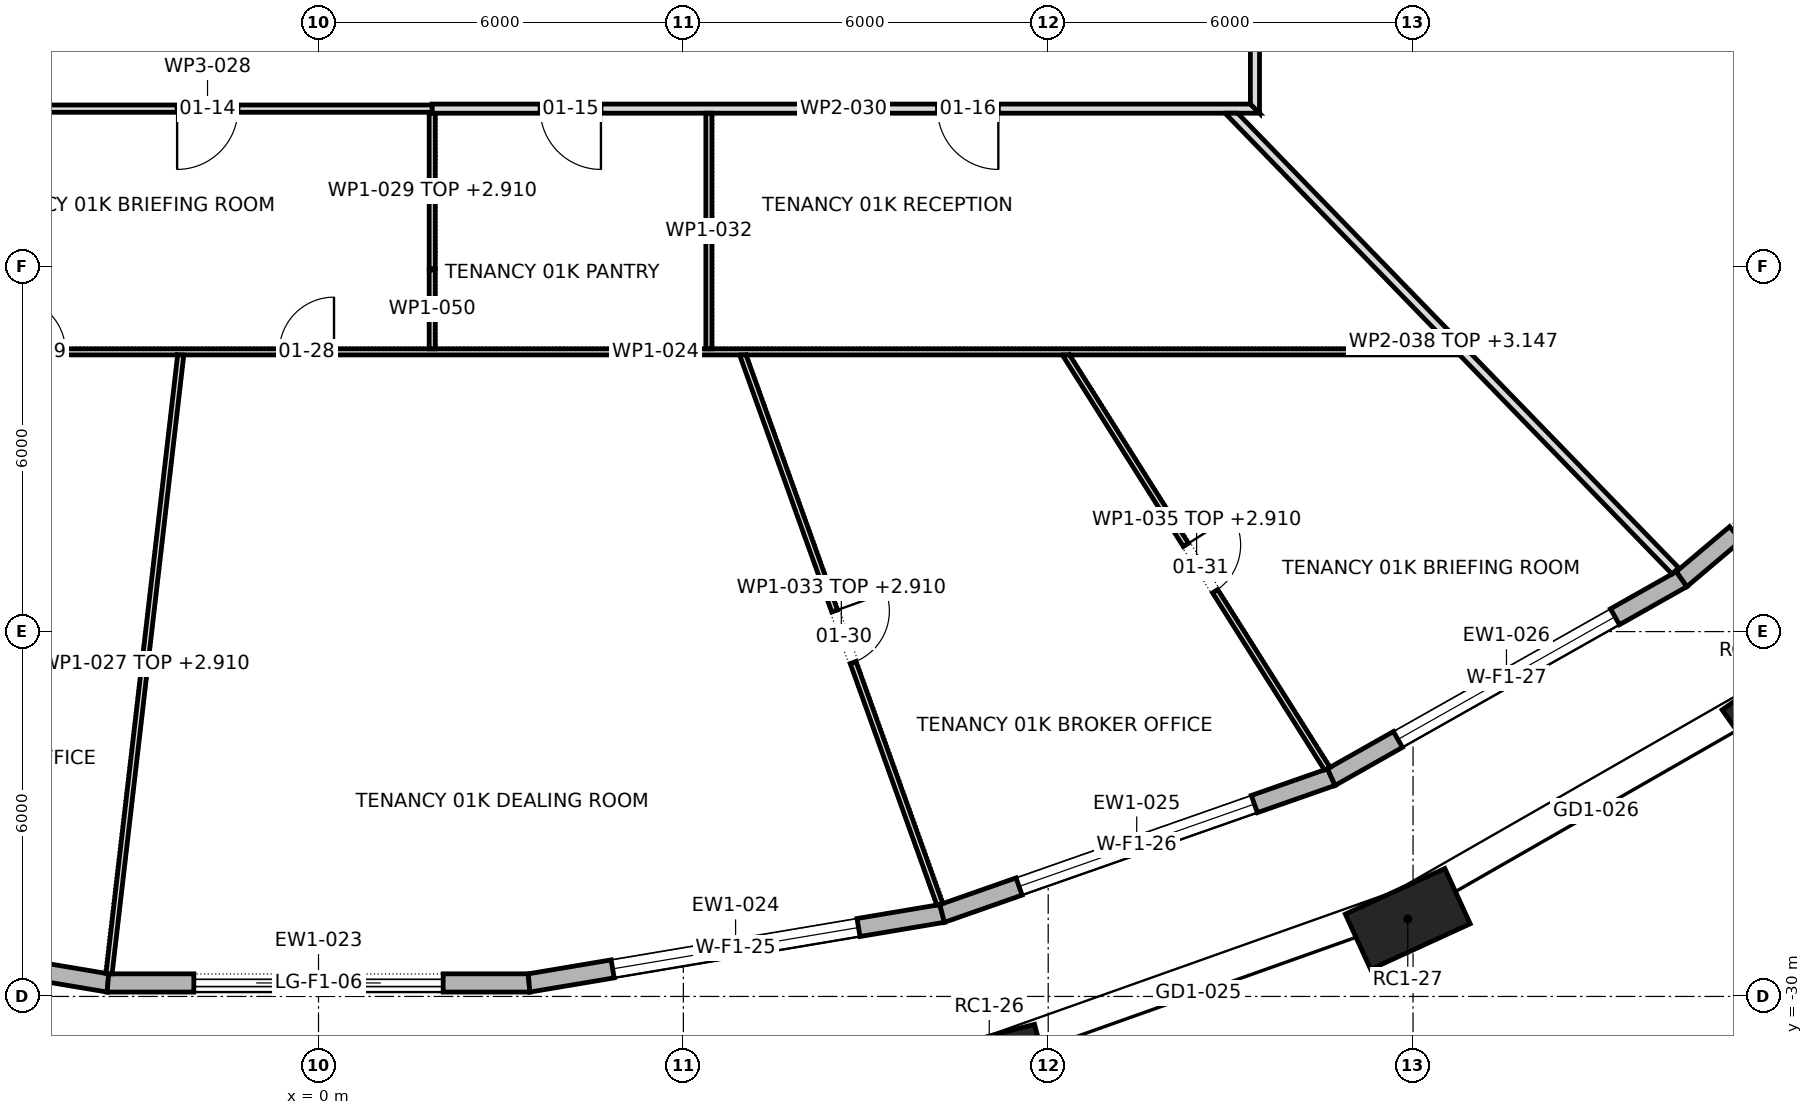
"""IFC4 building model, lengths in metres.
Left out: names, types, materials, properties, quantities, classifications, styles, units other than length and angle.
Written with IfcOpenShell. Run it as: python <this file> out.ifc"""

import sys

from ifc_helpers import new_model, si_unit, direction, frame, frame_2d, origin, origin_2d, place, context, subcontext, project, spatial, polyline, rectangle, outline, extrude, element, fill, save


model = new_model("IFC4")
c1 = context("Model", 3, precision=1e-05, world=origin(), true_north=direction((0.0, 1.0)))
c2 = subcontext(c1, "Body", "Model", "MODEL_VIEW")
j1 = project(units=[si_unit("LENGTHUNIT", "METRE"), si_unit("PLANEANGLEUNIT", "RADIAN")], contexts=[c1])
p1 = place(None, origin())
s1 = spatial("IfcSite", under=j1, at=p1, CompositionType="ELEMENT")
p2 = place(p1, origin())
s2 = spatial("IfcBuilding", under=s1, at=p2, CompositionType="ELEMENT")
p3 = place(p2, frame((0.0, 0.0, 27.7)))
s3 = spatial("IfcBuildingStorey", under=s2, at=p3, CompositionType="ELEMENT", Elevation=27.7)
for number, where, z_axis, x_axis in (
    (1, (11.031, -31.169, 0.0), (0.0, 0.0, 1.0), (0.968, 0.252, 0.0)),
    (2, (17.913, -28.725, 0.0), (0.0, 0.0, 1.0), (0.909, 0.417, 0.0)),
    (3, (24.107, -25.178, 0.0), (0.0, 0.0, 1.0), (0.818, 0.575, 0.0)),
):
    element("IfcColumn", number, at=place(p3, frame(where, z_axis=z_axis, x_axis=x_axis)), inside=s3, PredefinedType="COLUMN", context=c2, shape_type="SweptSolid", body=[
        extrude(rectangle(XDim=1.8, YDim=1.0, at=origin_2d()), origin(), (0.0, 0.0, 1.0), 4.2),
    ])
p4 = place(p3, frame((-10.256, -28.635, 0.0), z_axis=(0.0, 0.0, 1.0), x_axis=(0.986141805867, -0.165904607291, 0.0)))
e4 = element("IfcWall", 4, at=p4, inside=s3, PredefinedType="STANDARD", context=c2, shape_type="SweptSolid", body=[
    extrude(outline(polyline([(-0.013, -0.15), (6.901, -0.15), (6.876, 0.15), (0.013, 0.15), (-0.013, -0.15)])), origin(), (0.0, 0.0, 1.0), 3.9),
])
p5 = place(p4, frame((1.394, 0.0, 0.6)))
e5 = element("IfcOpeningElement", 5, at=p5, cuts=e4, PredefinedType="OPENING", context=c2, shape_type="SweptSolid", body=[
    extrude(rectangle(XDim=4.1, YDim=2.85, at=frame_2d((2.05, 1.425))), frame((0.0, 0.162, 0.0), z_axis=(0.0, -1.0, 0.0), x_axis=(1.0, 0.0, 0.0)), (0.0, 0.0, 1.0), 0.324),
])
p6 = place(p3, frame((-3.463, -29.778, 0.0), z_axis=(0.0, 0.0, 1.0), x_axis=(1.0, 0.0, 0.0)))
e6 = element("IfcWall", 6, at=p6, inside=s3, PredefinedType="STANDARD", context=c2, shape_type="SweptSolid", body=[
    extrude(outline(polyline([(-0.012, -0.15), (6.938, -0.15), (6.913, 0.15), (0.012, 0.15), (-0.012, -0.15)])), origin(), (0.0, 0.0, 1.0), 3.9),
])
p7 = place(p6, frame((1.413, 0.0, 0.0)))
e7 = element("IfcOpeningElement", 7, at=p7, cuts=e6, PredefinedType="OPENING", context=c2, shape_type="SweptSolid", body=[
    extrude(rectangle(XDim=4.1, YDim=3.45, at=frame_2d((2.05, 1.725))), frame((0.0, 0.162, 0.0), z_axis=(0.0, -1.0, 0.0), x_axis=(1.0, 0.0, 0.0)), (0.0, 0.0, 1.0), 0.324),
])
p8 = place(p3, frame((3.463, -29.778, 0.0), z_axis=(0.0, 0.0, 1.0), x_axis=(0.986141805867, 0.165904607291, 0.0)))
e8 = element("IfcWall", 8, at=p8, inside=s3, PredefinedType="STANDARD", context=c2, shape_type="SweptSolid", body=[
    extrude(outline(polyline([(-0.012, -0.15), (6.901, -0.15), (6.876, 0.15), (0.012, 0.15), (-0.012, -0.15)])), origin(), (0.0, 0.0, 1.0), 3.9),
])
p9 = place(p8, frame((1.394, 0.0, 0.6)))
e9 = element("IfcOpeningElement", 9, at=p9, cuts=e8, PredefinedType="OPENING", context=c2, shape_type="SweptSolid", body=[
    extrude(rectangle(XDim=4.1, YDim=2.85, at=frame_2d((2.05, 1.425))), frame((0.0, 0.162, 0.0), z_axis=(0.0, -1.0, 0.0), x_axis=(1.0, 0.0, 0.0)), (0.0, 0.0, 1.0), 0.324),
])
p10 = place(p3, frame((10.256, -28.635, 0.0), z_axis=(0.0, 0.0, 1.0), x_axis=(0.943767392455, 0.330610206947, 0.0)))
e10 = element("IfcWall", 10, at=p10, inside=s3, PredefinedType="STANDARD", context=c2, shape_type="SweptSolid", body=[
    extrude(outline(polyline([(-0.013, -0.15), (6.795, -0.15), (6.768, 0.15), (0.013, 0.15), (-0.013, -0.15)])), origin(), (0.0, 0.0, 1.0), 3.9),
])
p11 = place(p10, frame((1.341, 0.0, 0.6)))
e11 = element("IfcOpeningElement", 11, at=p11, cuts=e10, PredefinedType="OPENING", context=c2, shape_type="SweptSolid", body=[
    extrude(rectangle(XDim=4.1, YDim=2.85, at=frame_2d((2.05, 1.425))), frame((0.0, 0.162, 0.0), z_axis=(0.0, -1.0, 0.0), x_axis=(1.0, 0.0, 0.0)), (0.0, 0.0, 1.0), 0.324),
])
p12 = place(p3, frame((16.656, -26.393, 0.0), z_axis=(0.0, 0.0, 1.0), x_axis=(0.8705786416, 0.492029296678, 0.0)))
e12 = element("IfcWall", 12, at=p12, inside=s3, PredefinedType="STANDARD", context=c2, shape_type="SweptSolid", body=[
    extrude(outline(polyline([(-0.013, -0.15), (6.632, -0.15), (6.604, 0.15), (0.013, 0.15), (-0.013, -0.15)])), origin(), (0.0, 0.0, 1.0), 3.9),
])
p13 = place(p12, frame((1.259, 0.0, 0.6)))
e13 = element("IfcOpeningElement", 13, at=p13, cuts=e12, PredefinedType="OPENING", context=c2, shape_type="SweptSolid", body=[
    extrude(rectangle(XDim=4.1, YDim=2.85, at=frame_2d((2.05, 1.425))), frame((0.0, 0.162, 0.0), z_axis=(0.0, -1.0, 0.0), x_axis=(1.0, 0.0, 0.0)), (0.0, 0.0, 1.0), 0.324),
])
p14 = place(p3, frame((22.417, -23.137, 0.0), z_axis=(0.0, 0.0, 1.0), x_axis=(0.763540615407, 0.645759807223, 0.0)))
e14 = element("IfcWall", 14, at=p14, inside=s3, PredefinedType="STANDARD", context=c2, shape_type="SweptSolid", body=[
    extrude(outline(polyline([(-0.014, -0.15), (6.435, -0.15), (6.405, 0.15), (0.014, 0.15), (-0.014, -0.15)])), origin(), (0.0, 0.0, 1.0), 3.9),
])
p15 = place(p14, frame((1.16, 0.0, 0.0)))
e15 = element("IfcOpeningElement", 15, at=p15, cuts=e14, PredefinedType="OPENING", context=c2, shape_type="SweptSolid", body=[
    extrude(rectangle(XDim=4.1, YDim=3.45, at=frame_2d((2.05, 1.725))), frame((0.0, 0.162, 0.0), z_axis=(0.0, -1.0, 0.0), x_axis=(1.0, 0.0, 0.0)), (0.0, 0.0, 1.0), 0.324),
])
p16 = place(p3, frame((-6.894, -19.4, 0.0), z_axis=(0.0, 0.0, 1.0), x_axis=(1.0, 0.0, 0.0)))
e16 = element("IfcWall", 16, at=p16, inside=s3, PredefinedType="PARTITIONING", context=c2, shape_type="SweptSolid", body=[
    extrude(outline(polyline([(0.0, -0.05), (1.526, -0.05), (3.052, -0.05), (4.578, -0.05), (4.578, -0.049), (4.587, -0.05), (6.454, -0.05), (8.321, -0.05), (10.188, -0.05), (12.055, -0.05), (13.922, -0.05), (13.925, -0.049), (13.925, -0.05), (15.696, -0.05), (17.468, -0.05), (19.239, -0.05), (19.243, -0.047), (19.245, -0.05), (20.848, -0.05), (22.451, -0.05), (24.054, -0.05), (25.657, -0.05), (25.657, -0.05), (25.614, -0.005), (25.614, -0.005), (25.561, 0.05), (23.819, 0.05), (22.076, 0.05), (20.334, 0.05), (18.591, 0.05), (16.849, 0.05), (15.106, 0.05), (13.364, 0.05), (13.364, 0.05), (13.264, 0.05), (13.264, 0.05), (11.781, 0.05), (10.297, 0.05), (8.814, 0.05), (8.814, 0.05), (8.714, 0.05), (8.714, 0.05), (6.978, 0.05), (5.243, 0.05), (3.507, 0.05), (1.771, 0.05), (0.036, 0.05), (0.0, -0.049), (0.0, -0.05)])), origin(), (0.0, 0.0, 1.0), 3.9),
])
p17 = place(p16, frame((6.249, 0.0, 0.0)))
e17 = element("IfcOpeningElement", 17, at=p17, cuts=e16, PredefinedType="OPENING", context=c2, shape_type="SweptSolid", body=[
    extrude(rectangle(XDim=0.9, YDim=2.1, at=frame_2d((0.45, 1.05))), frame((0.0, 0.062, 0.0), z_axis=(0.0, -1.0, 0.0), x_axis=(1.0, 0.0, 0.0)), (0.0, 0.0, 1.0), 0.124),
])
p18 = place(p16, frame((1.834, 0.0, 0.0)))
e18 = element("IfcOpeningElement", 18, at=p18, cuts=e16, PredefinedType="OPENING", context=c2, shape_type="SweptSolid", body=[
    extrude(rectangle(XDim=0.9, YDim=2.1, at=frame_2d((0.45, 1.05))), frame((0.0, 0.062, 0.0), z_axis=(0.0, -1.0, 0.0), x_axis=(1.0, 0.0, 0.0)), (0.0, 0.0, 1.0), 0.124),
])
p19 = place(p3, frame((-3.445, -29.626, 0.0), z_axis=(0.0, 0.0, 1.0), x_axis=(0.115096942751, 0.993354263981, 0.0)))
e19 = element("IfcWall", 19, at=p19, inside=s3, PredefinedType="PARTITIONING", context=c2, shape_type="SweptSolid", body=[
    extrude(outline(polyline([(10.25, -0.05), (10.25, -0.047), (10.238, 0.05), (8.532, 0.05), (6.825, 0.05), (5.119, 0.05), (3.413, 0.05), (1.706, 0.05), (0.0, 0.05), (0.0, -0.018), (0.004, -0.05), (1.711, -0.05), (3.419, -0.05), (5.127, -0.05), (6.834, -0.05), (8.542, -0.05), (10.25, -0.05)])), origin(), (0.0, 0.0, 1.0), 2.91),
])
p20 = place(p3, frame((1.87, -15.4, 0.0), z_axis=(0.0, 0.0, 1.0), x_axis=(-1.0, 0.0, 0.0)))
e20 = element("IfcWall", 20, at=p20, inside=s3, PredefinedType="PARTITIONING", context=c2, shape_type="SweptSolid", body=[
    extrude(rectangle(XDim=7.39, YDim=0.12, at=frame_2d((3.695, 0.0))), origin(), (0.0, 0.0, 1.0), 3.9),
])
p21 = place(p20, frame((3.195, 0.0, 0.0)))
e21 = element("IfcOpeningElement", 21, at=p21, cuts=e20, PredefinedType="OPENING", context=c2, shape_type="SweptSolid", body=[
    extrude(rectangle(XDim=1.0, YDim=2.1, at=frame_2d((0.5, 1.05))), frame((0.0, 0.072, 0.0), z_axis=(0.0, -1.0, 0.0), x_axis=(1.0, 0.0, 0.0)), (0.0, 0.0, 1.0), 0.144),
])
p22 = place(p3, frame((1.87, -15.46, 0.0), z_axis=(0.0, 0.0, 1.0), x_axis=(0.0, -1.0, 0.0)))
e22 = element("IfcWall", 22, at=p22, inside=s3, PredefinedType="PARTITIONING", context=c2, shape_type="SweptSolid", body=[
    extrude(outline(polyline([(2.583, 0.05), (1.299, 0.05), (0.015, 0.05), (0.015, 0.0), (0.0, 0.0), (0.0, -0.05), (1.291, -0.05), (2.583, -0.05), (2.583, 0.05)])), origin(), (0.0, 0.0, 1.0), 2.91),
])
p23 = place(p3, frame((1.87, -15.4, 0.0), z_axis=(0.0, 0.0, 1.0), x_axis=(1.0, 0.0, 0.0)))
e23 = element("IfcWall", 23, at=p23, inside=s3, PredefinedType="PARTITIONING", context=c2, shape_type="SweptSolid", body=[
    extrude(outline(polyline([(0.0, -0.075), (1.944, -0.075), (3.887, -0.075), (5.831, -0.075), (7.774, -0.075), (9.718, -0.075), (11.661, -0.075), (13.605, -0.075), (13.455, 0.075), (11.533, 0.075), (9.611, 0.075), (7.688, 0.075), (5.766, 0.075), (3.844, 0.075), (1.922, 0.075), (0.0, 0.075), (0.0, -0.075)])), origin(), (0.0, 0.0, 1.0), 3.9),
])
p24 = place(p23, frame((1.775, 0.0, 0.0)))
e24 = element("IfcOpeningElement", 24, at=p24, cuts=e23, PredefinedType="OPENING", context=c2, shape_type="SweptSolid", body=[
    extrude(rectangle(XDim=1.0, YDim=2.1, at=frame_2d((0.5, 1.05))), frame((0.0, 0.087, 0.0), z_axis=(0.0, -1.0, 0.0), x_axis=(1.0, 0.0, 0.0)), (0.0, 0.0, 1.0), 0.174),
])
p25 = place(p23, frame((8.31, 0.0, 0.0)))
e25 = element("IfcOpeningElement", 25, at=p25, cuts=e23, PredefinedType="OPENING", context=c2, shape_type="SweptSolid", body=[
    extrude(rectangle(XDim=1.0, YDim=2.1, at=frame_2d((0.5, 1.05))), frame((0.0, 0.087, 0.0), z_axis=(0.0, -1.0, 0.0), x_axis=(1.0, 0.0, 0.0)), (0.0, 0.0, 1.0), 0.174),
])
p26 = place(p3, frame((6.42, -15.475, 0.0), z_axis=(0.0, 0.0, 1.0), x_axis=(0.0, -1.0, 0.0)))
e26 = element("IfcWall", 26, at=p26, inside=s3, PredefinedType="PARTITIONING", context=c2, shape_type="SweptSolid", body=[
    extrude(rectangle(XDim=3.875, YDim=0.1, at=frame_2d((1.938, 0.0))), origin(), (0.0, 0.0, 1.0), 3.9),
])
p27 = place(p3, frame((6.972, -19.433, 0.0), z_axis=(0.0, 0.0, 1.0), x_axis=(0.337548274923, -0.941308218437, 0.0)))
e27 = element("IfcWall", 27, at=p27, inside=s3, PredefinedType="PARTITIONING", context=c2, shape_type="SweptSolid", body=[
    extrude(outline(polyline([(0.0, -0.05), (1.922, -0.05), (3.845, -0.05), (5.767, -0.05), (7.689, -0.05), (9.612, -0.05), (9.62, -0.001), (9.62, 0.002), (9.62, 0.05), (7.703, 0.05), (5.786, 0.05), (3.87, 0.05), (1.953, 0.05), (0.036, 0.05), (0.0, -0.049), (0.0, -0.05)])), origin(), (0.0, 0.0, 1.0), 2.91),
])
p28 = place(p27, frame((4.492, 0.0, 0.0)))
e28 = element("IfcOpeningElement", 28, at=p28, cuts=e27, PredefinedType="OPENING", context=c2, shape_type="SweptSolid", body=[
    extrude(rectangle(XDim=0.9, YDim=2.1, at=frame_2d((0.45, 1.05))), frame((0.0, 0.062, 0.0), z_axis=(0.0, -1.0, 0.0), x_axis=(1.0, 0.0, 0.0)), (0.0, 0.0, 1.0), 0.124),
])
p29 = place(p3, frame((12.275, -19.424, 0.0), z_axis=(0.0, 0.0, 1.0), x_axis=(0.533945273126, -0.845519038997, 0.0)))
e29 = element("IfcWall", 29, at=p29, inside=s3, PredefinedType="PARTITIONING", context=c2, shape_type="SweptSolid", body=[
    extrude(outline(polyline([(0.0, -0.05), (1.614, -0.05), (3.228, -0.05), (4.842, -0.05), (6.456, -0.05), (8.071, -0.05), (8.083, 0.003), (8.085, 0.05), (8.085, 0.05), (6.48, 0.05), (4.876, 0.05), (3.272, 0.05), (1.667, 0.05), (0.063, 0.05), (0.0, -0.05), (0.0, -0.05)])), origin(), (0.0, 0.0, 1.0), 2.91),
])
p30 = place(p29, frame((3.727, 0.0, 0.0)))
e30 = element("IfcOpeningElement", 30, at=p30, cuts=e29, PredefinedType="OPENING", context=c2, shape_type="SweptSolid", body=[
    extrude(rectangle(XDim=0.9, YDim=2.1, at=frame_2d((0.45, 1.05))), frame((0.0, 0.062, 0.0), z_axis=(0.0, -1.0, 0.0), x_axis=(1.0, 0.0, 0.0)), (0.0, 0.0, 1.0), 0.124),
])
p31 = place(p3, frame((14.962, -15.423, 0.0), z_axis=(0.0, 0.0, 1.0), x_axis=(0.69624947088, -0.717799884578, 0.0)))
e31 = element("IfcWall", 31, at=p31, inside=s3, PredefinedType="PARTITIONING", context=c2, shape_type="SweptSolid", body=[
    extrude(outline(polyline([(0.0, -0.075), (1.799, -0.075), (3.599, -0.075), (5.398, -0.075), (5.465, -0.006), (5.537, -0.075), (7.21, -0.075), (8.884, -0.075), (10.558, -0.075), (10.558, -0.073), (10.558, 0.075), (8.823, 0.075), (7.087, 0.075), (5.352, 0.075), (3.616, 0.075), (1.881, 0.075), (0.145, 0.075), (0.0, -0.074), (0.0, -0.075)])), origin(), (0.0, 0.0, 1.0), 3.147),
])
p32 = place(p3, frame((15.4, -15.475, 0.0), z_axis=(0.0, 0.0, 1.0), x_axis=(0.0, 1.0, 0.0)))
e32 = element("IfcWall", 32, at=p32, inside=s3, PredefinedType="PARTITIONING", context=c2, shape_type="SweptSolid", body=[
    extrude(outline(polyline([(26.165, 0.075), (24.307, 0.075), (22.449, 0.075), (20.59, 0.075), (18.732, 0.075), (16.874, 0.075), (15.016, 0.075), (13.158, 0.075), (11.299, 0.075), (9.441, 0.075), (7.583, 0.075), (5.725, 0.075), (3.866, 0.075), (2.008, 0.075), (0.15, 0.075), (0.0, -0.075), (1.869, -0.075), (3.738, -0.075), (5.607, -0.075), (7.476, -0.075), (9.345, -0.075), (11.214, -0.075), (13.083, -0.075), (14.952, -0.075), (16.821, -0.075), (18.689, -0.075), (20.558, -0.075), (22.427, -0.075), (24.296, -0.075), (26.165, -0.075), (26.165, 0.075)])), origin(), (0.0, 0.0, 1.0), 3.9),
])
p33 = place(p32, frame((4.9, 0.0, 0.0)))
e33 = element("IfcOpeningElement", 33, at=p33, cuts=e32, PredefinedType="OPENING", context=c2, shape_type="SweptSolid", body=[
    extrude(rectangle(XDim=1.8, YDim=2.1, at=frame_2d((0.9, 1.05))), frame((0.0, 0.087, 0.0), z_axis=(0.0, -1.0, 0.0), x_axis=(1.0, 0.0, 0.0)), (0.0, 0.0, 1.0), 0.174),
])
p34 = place(p32, frame((14.975, 0.0, 0.0)))
e34 = element("IfcOpeningElement", 34, at=p34, cuts=e32, PredefinedType="OPENING", context=c2, shape_type="SweptSolid", body=[
    extrude(rectangle(XDim=1.0, YDim=2.1, at=frame_2d((0.5, 1.05))), frame((0.0, 0.087, 0.0), z_axis=(0.0, -1.0, 0.0), x_axis=(1.0, 0.0, 0.0)), (0.0, 0.0, 1.0), 0.174),
])
p35 = place(p32, frame((22.295, 0.0, 0.0)))
e35 = element("IfcOpeningElement", 35, at=p35, cuts=e32, PredefinedType="OPENING", context=c2, shape_type="SweptSolid", body=[
    extrude(rectangle(XDim=1.0, YDim=2.1, at=frame_2d((0.5, 1.05))), frame((0.0, 0.087, 0.0), z_axis=(0.0, -1.0, 0.0), x_axis=(1.0, 0.0, 0.0)), (0.0, 0.0, 1.0), 0.174),
])
p36 = place(p3, frame((1.87, -18.043, 0.0), z_axis=(0.0, 0.0, 1.0), x_axis=(0.0, -1.0, 0.0)))
e36 = element("IfcWall", 36, at=p36, inside=s3, PredefinedType="PARTITIONING", context=c2, shape_type="SweptSolid", body=[
    extrude(outline(polyline([(0.0, -0.05), (1.307, -0.05), (1.307, 0.05), (0.0, 0.05), (0.0, -0.05)])), origin(), (0.0, 0.0, 1.0), 3.9),
])
p37 = place(p7, origin())
e37 = element("IfcDoor", 37, at=p37, inside=s3, OperationType="DOUBLE_DOOR_SLIDING", PredefinedType="DOOR", context=c2, shape_type="SweptSolid", body=[
    extrude(rectangle(XDim=4.1, YDim=3.45, at=frame_2d((2.05, 1.725))), frame((0.0, 0.025, 0.0), z_axis=(0.0, -1.0, 0.0), x_axis=(1.0, 0.0, 0.0)), (0.0, 0.0, 1.0), 0.05),
])
fill(e7, e37)
p38 = place(p9, origin())
e38 = element("IfcWindow", 38, at=p38, inside=s3, PartitioningType="TRIPLE_PANEL_VERTICAL", PredefinedType="WINDOW", context=c2, shape_type="SweptSolid", body=[
    extrude(rectangle(XDim=4.1, YDim=2.85, at=frame_2d((2.05, 1.425))), frame((0.0, 0.03, 0.0), z_axis=(0.0, -1.0, 0.0), x_axis=(1.0, 0.0, 0.0)), (0.0, 0.0, 1.0), 0.06),
])
fill(e9, e38)
p39 = place(p11, origin())
e39 = element("IfcWindow", 39, at=p39, inside=s3, PartitioningType="TRIPLE_PANEL_VERTICAL", PredefinedType="WINDOW", context=c2, shape_type="SweptSolid", body=[
    extrude(rectangle(XDim=4.1, YDim=2.85, at=frame_2d((2.05, 1.425))), frame((0.0, 0.03, 0.0), z_axis=(0.0, -1.0, 0.0), x_axis=(1.0, 0.0, 0.0)), (0.0, 0.0, 1.0), 0.06),
])
fill(e11, e39)
p40 = place(p13, origin())
e40 = element("IfcWindow", 40, at=p40, inside=s3, PartitioningType="TRIPLE_PANEL_VERTICAL", PredefinedType="WINDOW", context=c2, shape_type="SweptSolid", body=[
    extrude(rectangle(XDim=4.1, YDim=2.85, at=frame_2d((2.05, 1.425))), frame((0.0, 0.03, 0.0), z_axis=(0.0, -1.0, 0.0), x_axis=(1.0, 0.0, 0.0)), (0.0, 0.0, 1.0), 0.06),
])
fill(e13, e40)
p41 = place(p21, origin())
e41 = element("IfcDoor", 41, at=p41, inside=s3, OperationType="SINGLE_SWING_LEFT", PredefinedType="DOOR", context=c2, shape_type="SweptSolid", body=[
    extrude(rectangle(XDim=1.0, YDim=2.1, at=frame_2d((0.5, 1.05))), frame((0.0, 0.025, 0.0), z_axis=(0.0, -1.0, 0.0), x_axis=(1.0, 0.0, 0.0)), (0.0, 0.0, 1.0), 0.05),
])
fill(e21, e41)
p42 = place(p24, frame((1.0, 0.0, 0.0), z_axis=(0.0, 0.0, 1.0), x_axis=(-1.0, 0.0, 0.0)))
e42 = element("IfcDoor", 42, at=p42, inside=s3, OperationType="SINGLE_SWING_RIGHT", PredefinedType="DOOR", context=c2, shape_type="SweptSolid", body=[
    extrude(rectangle(XDim=1.0, YDim=2.1, at=frame_2d((0.5, 1.05))), frame((0.0, 0.025, 0.0), z_axis=(0.0, -1.0, 0.0), x_axis=(1.0, 0.0, 0.0)), (0.0, 0.0, 1.0), 0.05),
])
fill(e24, e42)
p43 = place(p25, frame((1.0, 0.0, 0.0), z_axis=(0.0, 0.0, 1.0), x_axis=(-1.0, 0.0, 0.0)))
e43 = element("IfcDoor", 43, at=p43, inside=s3, OperationType="SINGLE_SWING_RIGHT", PredefinedType="DOOR", context=c2, shape_type="SweptSolid", body=[
    extrude(rectangle(XDim=1.0, YDim=2.1, at=frame_2d((0.5, 1.05))), frame((0.0, 0.025, 0.0), z_axis=(0.0, -1.0, 0.0), x_axis=(1.0, 0.0, 0.0)), (0.0, 0.0, 1.0), 0.05),
])
fill(e25, e43)
p44 = place(p17, origin())
e44 = element("IfcDoor", 44, at=p44, inside=s3, OperationType="SINGLE_SWING_LEFT", PredefinedType="DOOR", context=c2, shape_type="SweptSolid", body=[
    extrude(rectangle(XDim=0.9, YDim=2.1, at=frame_2d((0.45, 1.05))), frame((0.0, 0.025, 0.0), z_axis=(0.0, -1.0, 0.0), x_axis=(1.0, 0.0, 0.0)), (0.0, 0.0, 1.0), 0.05),
])
fill(e17, e44)
p45 = place(p18, origin())
e45 = element("IfcDoor", 45, at=p45, inside=s3, OperationType="SINGLE_SWING_RIGHT", PredefinedType="DOOR", context=c2, shape_type="SweptSolid", body=[
    extrude(rectangle(XDim=0.9, YDim=2.1, at=frame_2d((0.45, 1.05))), frame((0.0, 0.025, 0.0), z_axis=(0.0, -1.0, 0.0), x_axis=(1.0, 0.0, 0.0)), (0.0, 0.0, 1.0), 0.05),
])
fill(e18, e45)
p46 = place(p28, origin())
e46 = element("IfcDoor", 46, at=p46, inside=s3, OperationType="SINGLE_SWING_RIGHT", PredefinedType="DOOR", context=c2, shape_type="SweptSolid", body=[
    extrude(rectangle(XDim=0.9, YDim=2.1, at=frame_2d((0.45, 1.05))), frame((0.0, 0.025, 0.0), z_axis=(0.0, -1.0, 0.0), x_axis=(1.0, 0.0, 0.0)), (0.0, 0.0, 1.0), 0.05),
])
fill(e28, e46)
p47 = place(p30, origin())
e47 = element("IfcDoor", 47, at=p47, inside=s3, OperationType="SINGLE_SWING_RIGHT", PredefinedType="DOOR", context=c2, shape_type="SweptSolid", body=[
    extrude(rectangle(XDim=0.9, YDim=2.1, at=frame_2d((0.45, 1.05))), frame((0.0, 0.025, 0.0), z_axis=(0.0, -1.0, 0.0), x_axis=(1.0, 0.0, 0.0)), (0.0, 0.0, 1.0), 0.05),
])
fill(e30, e47)
save(model, sys.argv[1])
